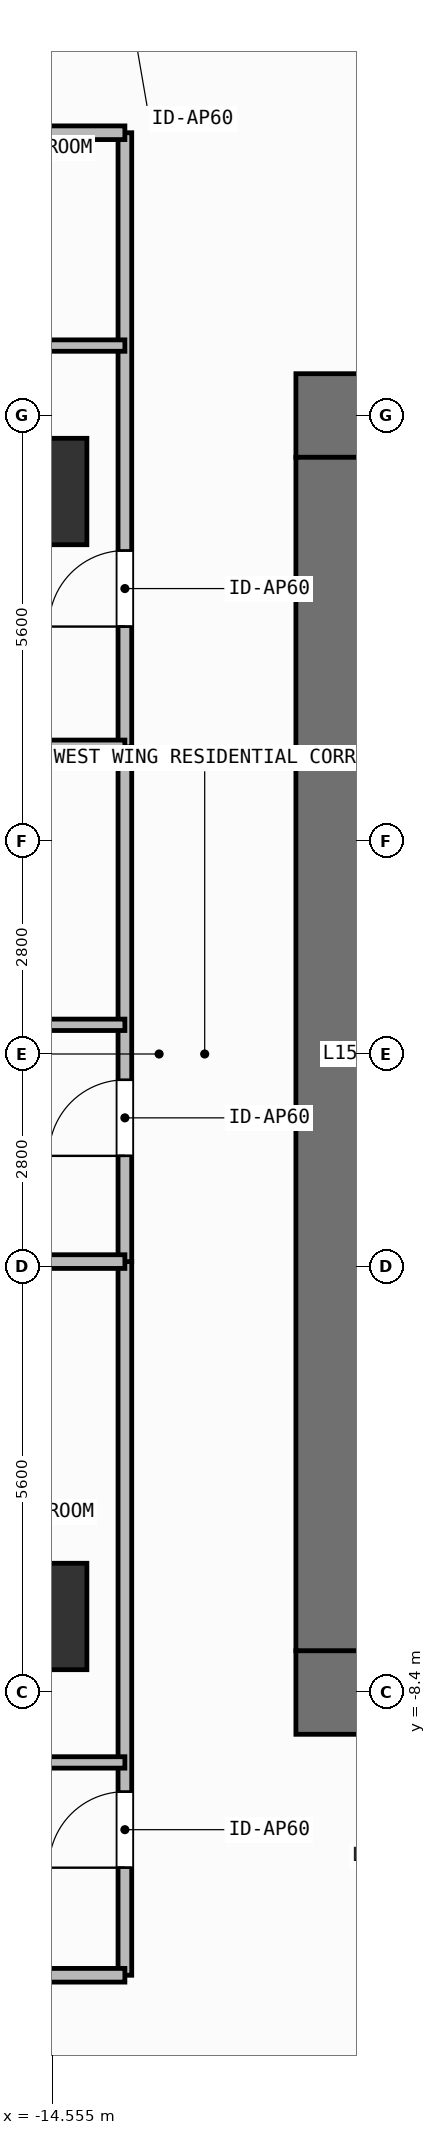
"""IFC4 building model, lengths in metres.
Left out: names, types, materials, properties, quantities, classifications, styles, units other than length and angle.
Written with IfcOpenShell. Run it as: python <this file> out.ifc"""

import sys

from ifc_helpers import new_model, si_unit, direction, frame, frame_2d, origin, origin_2d, place, context, subcontext, project, spatial, rectangle, extrude, element, fill, save


model = new_model("IFC4")
c1 = context("Model", 3, precision=1e-05, world=origin(), true_north=direction((0.0, 1.0)))
c2 = subcontext(c1, "Body", "Model", "MODEL_VIEW")
j1 = project(units=[si_unit("LENGTHUNIT", "METRE"), si_unit("PLANEANGLEUNIT", "RADIAN")], contexts=[c1])
p1 = place(None, origin())
s1 = spatial("IfcSite", under=j1, at=p1, CompositionType="ELEMENT")
p2 = place(p1, origin())
s2 = spatial("IfcBuilding", under=s1, at=p2, CompositionType="ELEMENT")
p3 = place(p2, frame((0.0, 0.0, 57.9)))
s3 = spatial("IfcBuildingStorey", under=s2, at=p3, CompositionType="ELEMENT", Elevation=57.9)
for number, where, z_axis, x_axis in (
    (1, (-11.35, -8.4, 0.0), (0.0, 0.0, 1.0), (1.0, 0.0, 0.0)),
    (2, (-11.35, 8.4, 0.0), (0.0, 0.0, 1.0), (1.0, 0.0, 0.0)),
):
    element("IfcWall", number, at=place(p3, frame(where, z_axis=z_axis, x_axis=x_axis)), inside=s3, PredefinedType="SHEAR", context=c2, shape_type="SweptSolid", body=[
        extrude(rectangle(XDim=1.65, YDim=1.1, at=frame_2d((0.825, 0.0))), origin(), (0.0, 0.0, 1.0), 3.9),
    ])
p4 = place(p3, frame((-10.8, -7.85, 0.0), z_axis=(0.0, 0.0, 1.0), x_axis=(0.0, 1.0, 0.0)))
e3 = element("IfcWall", 3, at=p4, inside=s3, PredefinedType="SHEAR", context=c2, shape_type="SweptSolid", body=[
    extrude(rectangle(XDim=15.7, YDim=1.1, at=frame_2d((7.85, 0.0))), origin(), (0.0, 0.0, 1.0), 3.9),
])
for number, where, z_axis, x_axis in (
    (4, (-14.8, -7.4, 0.0), (0.0, 0.0, 1.0), (1.0, 0.0, 0.0)),
    (5, (-14.8, 7.4, 0.0), (0.0, 0.0, 1.0), (1.0, 0.0, 0.0)),
):
    element("IfcColumn", number, at=place(p3, frame(where, z_axis=z_axis, x_axis=x_axis)), inside=s3, PredefinedType="COLUMN", context=c2, shape_type="SweptSolid", body=[
        extrude(rectangle(XDim=1.4, YDim=1.4, at=origin_2d()), origin(), (0.0, 0.0, 1.0), 3.9),
    ])
p5 = place(p3, frame((-13.6, -12.12, 0.0), z_axis=(0.0, 0.0, 1.0), x_axis=(0.0, 1.0, 0.0)))
e6 = element("IfcWall", 6, at=p5, inside=s3, PredefinedType="PARTITIONING", context=c2, shape_type="SweptSolid", body=[
    extrude(rectangle(XDim=9.389, YDim=0.18, at=frame_2d((4.695, 0.0))), origin(), (0.0, 0.0, 1.0), 3.68),
])
p6 = place(p5, frame((1.415, 0.0, 0.0)))
e7 = element("IfcOpeningElement", 7, at=p6, cuts=e6, PredefinedType="OPENING", context=c2, shape_type="SweptSolid", body=[
    extrude(rectangle(XDim=1.0, YDim=2.2, at=frame_2d((0.5, 1.1))), frame((0.0, 0.1, 0.0), z_axis=(0.0, -1.0, 0.0), x_axis=(1.0, 0.0, 0.0)), (0.0, 0.0, 1.0), 0.2),
])
p7 = place(p3, frame((-16.863, -9.32, 0.0), z_axis=(0.0, 0.0, 1.0), x_axis=(1.0, 0.0, 0.0)))
e8 = element("IfcWall", 8, at=p7, inside=s3, PredefinedType="PARTITIONING", context=c2, shape_type="SweptSolid", body=[
    extrude(rectangle(XDim=3.263, YDim=0.15, at=frame_2d((1.631, 0.0))), origin(), (0.0, 0.0, 1.0), 3.68),
])
p8 = place(p7, frame((0.334, 0.0, 0.0)))
e9 = element("IfcOpeningElement", 9, at=p8, cuts=e8, PredefinedType="OPENING", context=c2, shape_type="SweptSolid", body=[
    extrude(rectangle(XDim=0.85, YDim=2.1, at=frame_2d((0.425, 1.05))), frame((0.0, 0.085, 0.0), z_axis=(0.0, -1.0, 0.0), x_axis=(1.0, 0.0, 0.0)), (0.0, 0.0, 1.0), 0.17),
])
p9 = place(p3, frame((-13.6, -2.731, 0.0), z_axis=(0.0, 0.0, 1.0), x_axis=(0.0, 1.0, 0.0)))
e10 = element("IfcWall", 10, at=p9, inside=s3, PredefinedType="PARTITIONING", context=c2, shape_type="SweptSolid", body=[
    extrude(rectangle(XDim=6.771, YDim=0.18, at=frame_2d((3.385, 0.0))), origin(), (0.0, 0.0, 1.0), 3.68),
])
p10 = place(p9, frame((1.391, 0.0, 0.0)))
e11 = element("IfcOpeningElement", 11, at=p10, cuts=e10, PredefinedType="OPENING", context=c2, shape_type="SweptSolid", body=[
    extrude(rectangle(XDim=1.0, YDim=2.2, at=frame_2d((0.5, 1.1))), frame((0.0, 0.1, 0.0), z_axis=(0.0, -1.0, 0.0), x_axis=(1.0, 0.0, 0.0)), (0.0, 0.0, 1.0), 0.2),
])
p11 = place(p3, frame((-16.902, 0.384, 0.0), z_axis=(0.0, 0.0, 1.0), x_axis=(1.0, 0.0, 0.0)))
e12 = element("IfcWall", 12, at=p11, inside=s3, PredefinedType="PARTITIONING", context=c2, shape_type="SweptSolid", body=[
    extrude(rectangle(XDim=3.302, YDim=0.15, at=frame_2d((1.651, 0.0))), origin(), (0.0, 0.0, 1.0), 3.68),
])
p12 = place(p11, frame((1.226, 0.0, 0.0)))
e13 = element("IfcOpeningElement", 13, at=p12, cuts=e12, PredefinedType="OPENING", context=c2, shape_type="SweptSolid", body=[
    extrude(rectangle(XDim=0.85, YDim=2.1, at=frame_2d((0.425, 1.05))), frame((0.0, 0.085, 0.0), z_axis=(0.0, -1.0, 0.0), x_axis=(1.0, 0.0, 0.0)), (0.0, 0.0, 1.0), 0.17),
])
p13 = place(p3, frame((-13.6, 4.04, 0.0), z_axis=(0.0, 0.0, 1.0), x_axis=(0.0, 1.0, 0.0)))
e14 = element("IfcWall", 14, at=p13, inside=s3, PredefinedType="PARTITIONING", context=c2, shape_type="SweptSolid", body=[
    extrude(rectangle(XDim=8.08, YDim=0.18, at=frame_2d((4.04, 0.0))), origin(), (0.0, 0.0, 1.0), 3.68),
])
p14 = place(p13, frame((1.583, 0.0, 0.0)))
e15 = element("IfcOpeningElement", 15, at=p14, cuts=e14, PredefinedType="OPENING", context=c2, shape_type="SweptSolid", body=[
    extrude(rectangle(XDim=1.0, YDim=2.2, at=frame_2d((0.5, 1.1))), frame((0.0, 0.1, 0.0), z_axis=(0.0, -1.0, 0.0), x_axis=(1.0, 0.0, 0.0)), (0.0, 0.0, 1.0), 0.2),
])
p15 = place(p3, frame((-16.902, 9.32, 0.0), z_axis=(0.0, 0.0, 1.0), x_axis=(1.0, 0.0, 0.0)))
e16 = element("IfcWall", 16, at=p15, inside=s3, PredefinedType="PARTITIONING", context=c2, shape_type="SweptSolid", body=[
    extrude(rectangle(XDim=3.302, YDim=0.15, at=frame_2d((1.651, 0.0))), origin(), (0.0, 0.0, 1.0), 3.68),
])
p16 = place(p15, frame((0.338, 0.0, 0.0)))
e17 = element("IfcOpeningElement", 17, at=p16, cuts=e16, PredefinedType="OPENING", context=c2, shape_type="SweptSolid", body=[
    extrude(rectangle(XDim=0.85, YDim=2.1, at=frame_2d((0.425, 1.05))), frame((0.0, 0.085, 0.0), z_axis=(0.0, -1.0, 0.0), x_axis=(1.0, 0.0, 0.0)), (0.0, 0.0, 1.0), 0.17),
])
for number, where, z_axis, x_axis in (
    (18, (-27.93, -2.731, 0.0), (0.0, 0.0, 1.0), (1.0, 0.0, 0.0)),
    (19, (-27.93, 4.04, 0.0), (0.0, 0.0, 1.0), (1.0, 0.0, 0.0)),
    (20, (-27.93, -12.12, 0.0), (0.0, 0.0, 1.0), (1.0, 0.0, 0.0)),
    (21, (-27.93, 12.12, 0.0), (0.0, 0.0, 1.0), (1.0, 0.0, 0.0)),
):
    element("IfcWall", number, at=place(p3, frame(where, z_axis=z_axis, x_axis=x_axis)), inside=s3, PredefinedType="PARTITIONING", context=c2, shape_type="SweptSolid", body=[
        extrude(rectangle(XDim=14.33, YDim=0.18, at=frame_2d((7.165, 0.0))), origin(), (0.0, 0.0, 1.0), 3.68),
    ])
p17 = place(p6, origin())
e22 = element("IfcDoor", 22, at=p17, inside=s3, OperationType="SINGLE_SWING_LEFT", PredefinedType="DOOR", context=c2, shape_type="SweptSolid", body=[
    extrude(rectangle(XDim=1.0, YDim=2.2, at=frame_2d((0.5, 1.1))), frame((0.0, 0.025, 0.0), z_axis=(0.0, -1.0, 0.0), x_axis=(1.0, 0.0, 0.0)), (0.0, 0.0, 1.0), 0.05),
])
fill(e7, e22)
p18 = place(p10, origin())
e23 = element("IfcDoor", 23, at=p18, inside=s3, OperationType="SINGLE_SWING_LEFT", PredefinedType="DOOR", context=c2, shape_type="SweptSolid", body=[
    extrude(rectangle(XDim=1.0, YDim=2.2, at=frame_2d((0.5, 1.1))), frame((0.0, 0.025, 0.0), z_axis=(0.0, -1.0, 0.0), x_axis=(1.0, 0.0, 0.0)), (0.0, 0.0, 1.0), 0.05),
])
fill(e11, e23)
p19 = place(p14, origin())
e24 = element("IfcDoor", 24, at=p19, inside=s3, OperationType="SINGLE_SWING_LEFT", PredefinedType="DOOR", context=c2, shape_type="SweptSolid", body=[
    extrude(rectangle(XDim=1.0, YDim=2.2, at=frame_2d((0.5, 1.1))), frame((0.0, 0.025, 0.0), z_axis=(0.0, -1.0, 0.0), x_axis=(1.0, 0.0, 0.0)), (0.0, 0.0, 1.0), 0.05),
])
fill(e15, e24)
save(model, sys.argv[1])
